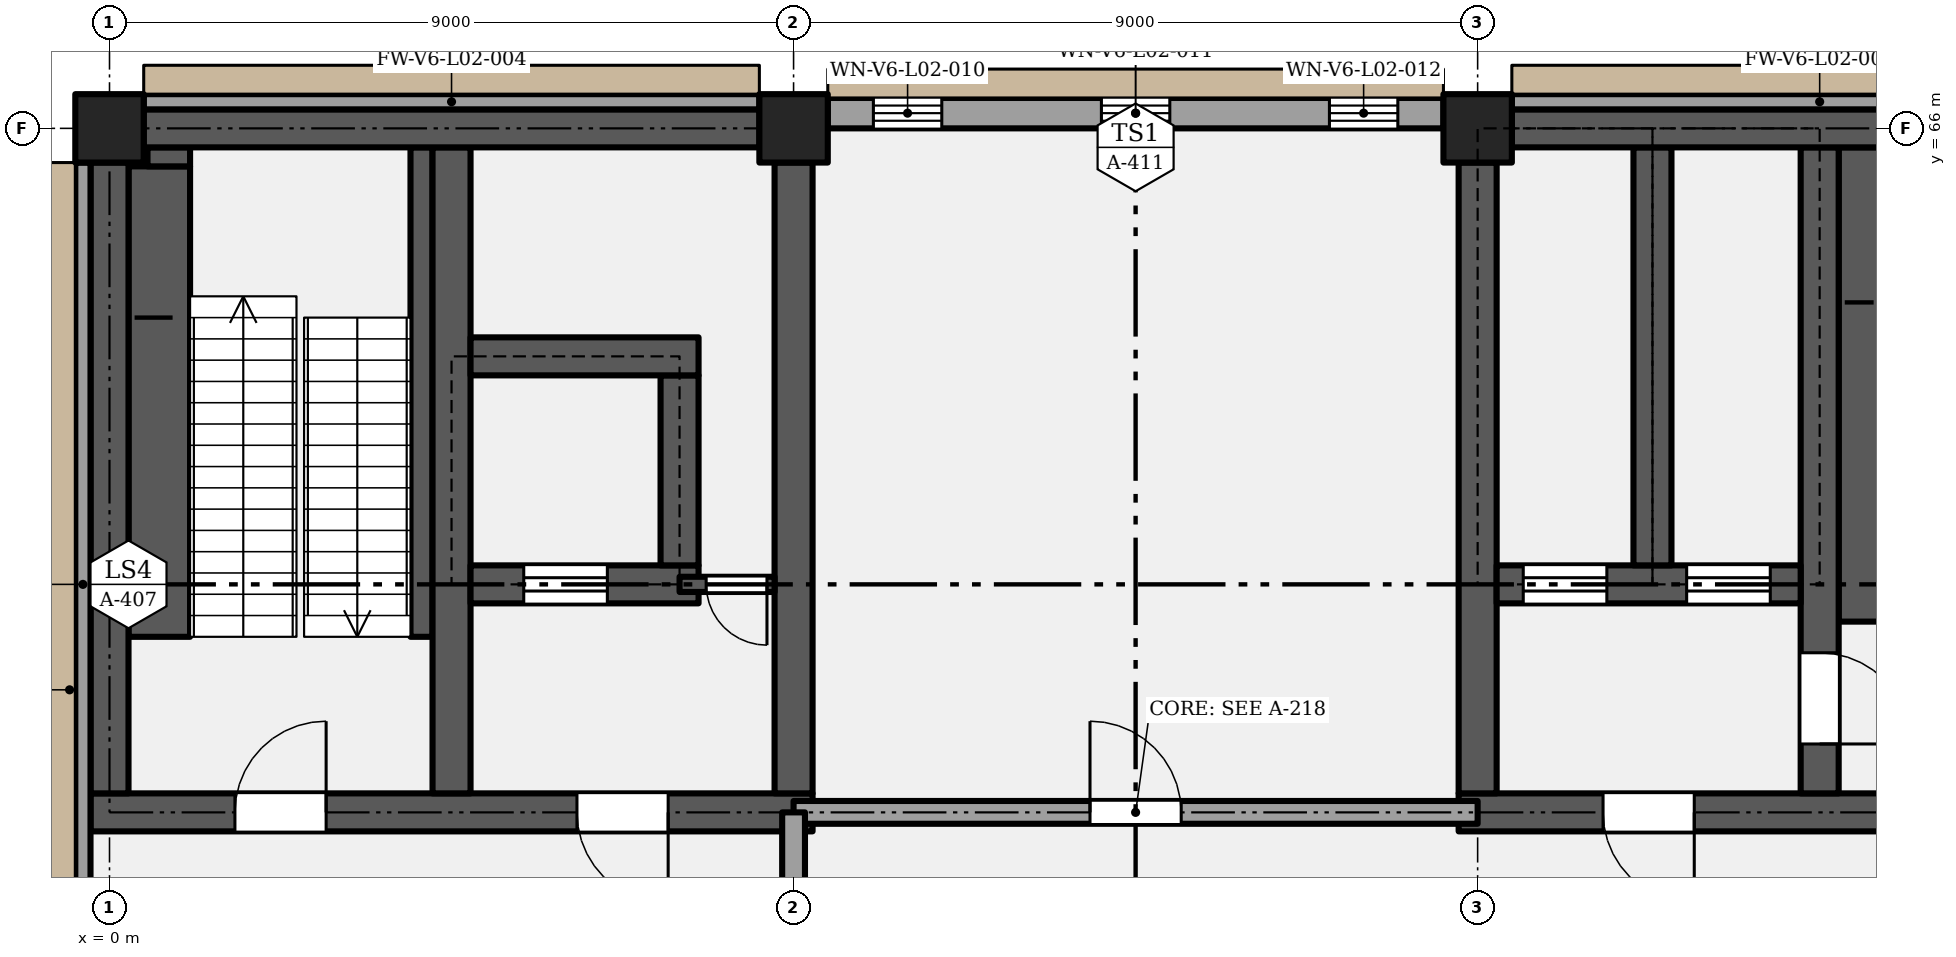
"""IFC4 building model, lengths in metres.
Left out: names, types, materials, properties, quantities, classifications, styles, units other than length and angle.
Written with IfcOpenShell. Run it as: python <this file> out.ifc"""

import sys

from ifc_helpers import new_model, si_unit, direction, frame, frame_2d, origin, origin_2d, place, context, subcontext, project, spatial, rectangle, extrude, element, fill, save


model = new_model("IFC4")
c1 = context("Model", 3, precision=1e-05, world=origin(), true_north=direction((0.0, 1.0)))
c2 = subcontext(c1, "Body", "Model", "MODEL_VIEW")
j1 = project(units=[si_unit("LENGTHUNIT", "METRE"), si_unit("PLANEANGLEUNIT", "RADIAN")], contexts=[c1])
p1 = place(None, origin())
s1 = spatial("IfcSite", under=j1, at=p1, CompositionType="ELEMENT")
p2 = place(p1, origin())
s2 = spatial("IfcBuilding", under=s1, at=p2, CompositionType="ELEMENT")
p3 = place(p2, frame((0.0, 0.0, 12.0)))
s3 = spatial("IfcBuildingStorey", under=s2, at=p3, CompositionType="ELEMENT", Elevation=12.0)
for number, where, z_axis, x_axis in (
    (1, (0.0, 66.0, 0.0), (0.0, 0.0, 1.0), (1.0, 0.0, 0.0)),
    (2, (9.0, 66.0, 0.0), (0.0, 0.0, 1.0), (1.0, 0.0, 0.0)),
    (3, (18.0, 66.0, 0.0), (0.0, 0.0, 1.0), (1.0, 0.0, 0.0)),
):
    element("IfcColumn", number, at=place(p3, frame(where, z_axis=z_axis, x_axis=x_axis)), inside=s3, PredefinedType="COLUMN", context=c2, shape_type="SweptSolid", body=[
        extrude(rectangle(XDim=0.9, YDim=0.9, at=origin_2d()), origin(), (0.0, 0.0, 1.0), 5.4),
    ])
p4 = place(p3, frame((-0.25, 57.0, 0.0), z_axis=(0.0, 0.0, 1.0), x_axis=(1.0, 0.0, 0.0)))
e4 = element("IfcWall", 4, at=p4, inside=s3, PredefinedType="SHEAR", context=c2, shape_type="SweptSolid", body=[
    extrude(rectangle(XDim=9.5, YDim=0.5, at=frame_2d((4.75, 0.0))), origin(), (0.0, 0.0, 1.0), 5.15),
])
p5 = place(p4, frame((1.9, 0.0, 0.0)))
e5 = element("IfcOpeningElement", 5, at=p5, cuts=e4, PredefinedType="OPENING", context=c2, shape_type="SweptSolid", body=[
    extrude(rectangle(XDim=1.2, YDim=2.1, at=frame_2d((0.6, 1.05))), frame((0.0, 0.26, 0.0), z_axis=(0.0, -1.0, 0.0), x_axis=(1.0, 0.0, 0.0)), (0.0, 0.0, 1.0), 0.52),
])
p6 = place(p4, frame((7.6, 0.0, 0.0), z_axis=(0.0, 0.0, 1.0), x_axis=(-1.0, 0.0, 0.0)))
e6 = element("IfcOpeningElement", 6, at=p6, cuts=e4, PredefinedType="OPENING", context=c2, shape_type="SweptSolid", body=[
    extrude(rectangle(XDim=1.2, YDim=2.1, at=frame_2d((0.6, 1.05))), frame((0.0, 0.26, 0.0), z_axis=(0.0, -1.0, 0.0), x_axis=(1.0, 0.0, 0.0)), (0.0, 0.0, 1.0), 0.52),
])
p7 = place(p3, frame((17.75, 57.0, 0.0), z_axis=(0.0, 0.0, 1.0), x_axis=(1.0, 0.0, 0.0)))
e7 = element("IfcWall", 7, at=p7, inside=s3, PredefinedType="SHEAR", context=c2, shape_type="SweptSolid", body=[
    extrude(rectangle(XDim=9.5, YDim=0.5, at=frame_2d((4.75, 0.0))), origin(), (0.0, 0.0, 1.0), 5.15),
])
p8 = place(p7, frame((3.1, 0.0, 0.0), z_axis=(0.0, 0.0, 1.0), x_axis=(-1.0, 0.0, 0.0)))
e8 = element("IfcOpeningElement", 8, at=p8, cuts=e7, PredefinedType="OPENING", context=c2, shape_type="SweptSolid", body=[
    extrude(rectangle(XDim=1.2, YDim=2.1, at=frame_2d((0.6, 1.05))), frame((0.0, 0.26, 0.0), z_axis=(0.0, -1.0, 0.0), x_axis=(1.0, 0.0, 0.0)), (0.0, 0.0, 1.0), 0.52),
])
p9 = place(p7, frame((6.4, 0.0, 0.0)))
e9 = element("IfcOpeningElement", 9, at=p9, cuts=e7, PredefinedType="OPENING", context=c2, shape_type="SweptSolid", body=[
    extrude(rectangle(XDim=1.2, YDim=2.1, at=frame_2d((0.6, 1.05))), frame((0.0, 0.26, 0.0), z_axis=(0.0, -1.0, 0.0), x_axis=(1.0, 0.0, 0.0)), (0.0, 0.0, 1.0), 0.52),
])
p10 = place(p3, frame((0.0, 57.25, 0.0), z_axis=(0.0, 0.0, 1.0), x_axis=(0.0, 1.0, 0.0)))
e10 = element("IfcWall", 10, at=p10, inside=s3, PredefinedType="SHEAR", context=c2, shape_type="SweptSolid", body=[
    extrude(rectangle(XDim=8.3, YDim=0.5, at=frame_2d((4.15, 0.0))), origin(), (0.0, 0.0, 1.0), 5.15),
])
p11 = place(p3, frame((4.5, 57.25, 0.0), z_axis=(0.0, 0.0, 1.0), x_axis=(0.0, 1.0, 0.0)))
e11 = element("IfcWall", 11, at=p11, inside=s3, PredefinedType="SHEAR", context=c2, shape_type="SweptSolid", body=[
    extrude(rectangle(XDim=8.5, YDim=0.5, at=frame_2d((4.25, 0.0))), origin(), (0.0, 0.0, 1.0), 5.15),
])
for number, where, z_axis, x_axis in (
    (12, (9.0, 57.25, 0.0), (0.0, 0.0, 1.0), (0.0, 1.0, 0.0)),
    (13, (18.0, 57.25, 0.0), (0.0, 0.0, 1.0), (0.0, 1.0, 0.0)),
):
    element("IfcWall", number, at=place(p3, frame(where, z_axis=z_axis, x_axis=x_axis)), inside=s3, PredefinedType="SHEAR", context=c2, shape_type="SweptSolid", body=[
        extrude(rectangle(XDim=8.3, YDim=0.5, at=frame_2d((4.15, 0.0))), origin(), (0.0, 0.0, 1.0), 5.15),
    ])
p12 = place(p3, frame((22.5, 57.25, 0.0), z_axis=(0.0, 0.0, 1.0), x_axis=(0.0, 1.0, 0.0)))
e14 = element("IfcWall", 14, at=p12, inside=s3, PredefinedType="SHEAR", context=c2, shape_type="SweptSolid", body=[
    extrude(rectangle(XDim=8.5, YDim=0.5, at=frame_2d((4.25, 0.0))), origin(), (0.0, 0.0, 1.0), 5.15),
])
p13 = place(p12, frame((1.85, 0.0, 0.0), z_axis=(0.0, 0.0, 1.0), x_axis=(-1.0, 0.0, 0.0)))
e15 = element("IfcOpeningElement", 15, at=p13, cuts=e14, PredefinedType="OPENING", context=c2, shape_type="SweptSolid", body=[
    extrude(rectangle(XDim=1.2, YDim=2.1, at=frame_2d((0.6, 1.05))), frame((0.0, 0.26, 0.0), z_axis=(0.0, -1.0, 0.0), x_axis=(1.0, 0.0, 0.0)), (0.0, 0.0, 1.0), 0.52),
])
p14 = place(p3, frame((4.75, 60.0, 0.0), z_axis=(0.0, 0.0, 1.0), x_axis=(1.0, 0.0, 0.0)))
e16 = element("IfcWall", 16, at=p14, inside=s3, PredefinedType="SHEAR", context=c2, shape_type="SweptSolid", body=[
    extrude(rectangle(XDim=3.0, YDim=0.5, at=frame_2d((1.5, 0.0))), origin(), (0.0, 0.0, 1.0), 5.15),
])
p15 = place(p14, frame((0.7, 0.0, 0.0)))
e17 = element("IfcOpeningElement", 17, at=p15, cuts=e16, PredefinedType="OPENING", context=c2, shape_type="SweptSolid", body=[
    extrude(rectangle(XDim=1.1, YDim=2.1, at=frame_2d((0.55, 1.05))), frame((0.0, 0.26, 0.0), z_axis=(0.0, -1.0, 0.0), x_axis=(1.0, 0.0, 0.0)), (0.0, 0.0, 1.0), 0.52),
])
p16 = place(p3, frame((18.25, 60.0, 0.0), z_axis=(0.0, 0.0, 1.0), x_axis=(1.0, 0.0, 0.0)))
e18 = element("IfcWall", 18, at=p16, inside=s3, PredefinedType="SHEAR", context=c2, shape_type="SweptSolid", body=[
    extrude(rectangle(XDim=4.0, YDim=0.5, at=frame_2d((2.0, 0.0))), origin(), (0.0, 0.0, 1.0), 5.15),
])
p17 = place(p16, frame((0.35, 0.0, 0.0)))
e19 = element("IfcOpeningElement", 19, at=p17, cuts=e18, PredefinedType="OPENING", context=c2, shape_type="SweptSolid", body=[
    extrude(rectangle(XDim=1.1, YDim=2.1, at=frame_2d((0.55, 1.05))), frame((0.0, 0.26, 0.0), z_axis=(0.0, -1.0, 0.0), x_axis=(1.0, 0.0, 0.0)), (0.0, 0.0, 1.0), 0.52),
])
p18 = place(p16, frame((2.5, 0.0, 0.0)))
e20 = element("IfcOpeningElement", 20, at=p18, cuts=e18, PredefinedType="OPENING", context=c2, shape_type="SweptSolid", body=[
    extrude(rectangle(XDim=1.1, YDim=2.1, at=frame_2d((0.55, 1.05))), frame((0.0, 0.26, 0.0), z_axis=(0.0, -1.0, 0.0), x_axis=(1.0, 0.0, 0.0)), (0.0, 0.0, 1.0), 0.52),
])
p19 = place(p3, frame((7.5, 60.25, 0.0), z_axis=(0.0, 0.0, 1.0), x_axis=(0.0, 1.0, 0.0)))
e21 = element("IfcWall", 21, at=p19, inside=s3, PredefinedType="SHEAR", context=c2, shape_type="SweptSolid", body=[
    extrude(rectangle(XDim=2.5, YDim=0.5, at=frame_2d((1.25, 0.0))), origin(), (0.0, 0.0, 1.0), 5.15),
])
p20 = place(p3, frame((20.3, 60.25, 0.0), z_axis=(0.0, 0.0, 1.0), x_axis=(0.0, 1.0, 0.0)))
e22 = element("IfcWall", 22, at=p20, inside=s3, PredefinedType="SHEAR", context=c2, shape_type="SweptSolid", body=[
    extrude(rectangle(XDim=5.5, YDim=0.5, at=frame_2d((2.75, 0.0))), origin(), (0.0, 0.0, 1.0), 5.15),
])
p21 = place(p3, frame((4.75, 63.0, 0.0), z_axis=(0.0, 0.0, 1.0), x_axis=(1.0, 0.0, 0.0)))
e23 = element("IfcWall", 23, at=p21, inside=s3, PredefinedType="SHEAR", context=c2, shape_type="SweptSolid", body=[
    extrude(rectangle(XDim=3.0, YDim=0.5, at=frame_2d((1.5, 0.0))), origin(), (0.0, 0.0, 1.0), 5.15),
])
for number, where, z_axis, x_axis in (
    (24, (0.45, 66.0, 0.0), (0.0, 0.0, 1.0), (1.0, 0.0, 0.0)),
    (25, (18.45, 66.0, 0.0), (0.0, 0.0, 1.0), (1.0, 0.0, 0.0)),
):
    element("IfcWall", number, at=place(p3, frame(where, z_axis=z_axis, x_axis=x_axis)), inside=s3, PredefinedType="SHEAR", context=c2, shape_type="SweptSolid", body=[
        extrude(rectangle(XDim=8.1, YDim=0.5, at=frame_2d((4.05, 0.0))), origin(), (0.0, 0.0, 1.0), 5.15),
    ])
p22 = place(p3, frame((0.45, 66.35, 0.0), z_axis=(0.0, 0.0, 1.0), x_axis=(1.0, 0.0, 0.0)))
e26 = element("IfcWall", 26, at=p22, inside=s3, PredefinedType="SOLIDWALL", context=c2, shape_type="SweptSolid", body=[
    extrude(rectangle(XDim=8.1, YDim=0.2, at=frame_2d((4.05, 0.0))), origin(), (0.0, 0.0, 1.0), 5.15),
])
p23 = place(p3, frame((9.45, 66.2, 0.0), z_axis=(0.0, 0.0, 1.0), x_axis=(1.0, 0.0, 0.0)))
e27 = element("IfcWall", 27, at=p23, inside=s3, PredefinedType="SOLIDWALL", context=c2, shape_type="SweptSolid", body=[
    extrude(rectangle(XDim=8.1, YDim=0.4, at=frame_2d((4.05, 0.0))), origin(), (0.0, 0.0, 1.0), 5.15),
])
p24 = place(p23, frame((0.6, 0.0, 1.5)))
e28 = element("IfcOpeningElement", 28, at=p24, cuts=e27, PredefinedType="OPENING", context=c2, shape_type="SweptSolid", body=[
    extrude(rectangle(XDim=0.9, YDim=1.8, at=frame_2d((0.45, 0.9))), frame((0.0, 0.21, 0.0), z_axis=(0.0, -1.0, 0.0), x_axis=(1.0, 0.0, 0.0)), (0.0, 0.0, 1.0), 0.42),
])
p25 = place(p23, frame((3.6, 0.0, 1.5)))
e29 = element("IfcOpeningElement", 29, at=p25, cuts=e27, PredefinedType="OPENING", context=c2, shape_type="SweptSolid", body=[
    extrude(rectangle(XDim=0.9, YDim=1.8, at=frame_2d((0.45, 0.9))), frame((0.0, 0.21, 0.0), z_axis=(0.0, -1.0, 0.0), x_axis=(1.0, 0.0, 0.0)), (0.0, 0.0, 1.0), 0.42),
])
p26 = place(p23, frame((6.6, 0.0, 1.5)))
e30 = element("IfcOpeningElement", 30, at=p26, cuts=e27, PredefinedType="OPENING", context=c2, shape_type="SweptSolid", body=[
    extrude(rectangle(XDim=0.9, YDim=1.8, at=frame_2d((0.45, 0.9))), frame((0.0, 0.21, 0.0), z_axis=(0.0, -1.0, 0.0), x_axis=(1.0, 0.0, 0.0)), (0.0, 0.0, 1.0), 0.42),
])
p27 = place(p3, frame((18.45, 66.35, 0.0), z_axis=(0.0, 0.0, 1.0), x_axis=(1.0, 0.0, 0.0)))
e31 = element("IfcWall", 31, at=p27, inside=s3, PredefinedType="SOLIDWALL", context=c2, shape_type="SweptSolid", body=[
    extrude(rectangle(XDim=8.1, YDim=0.2, at=frame_2d((4.05, 0.0))), origin(), (0.0, 0.0, 1.0), 5.15),
])
p28 = place(p3, frame((-0.35, 54.45, 0.0), z_axis=(0.0, 0.0, 1.0), x_axis=(0.0, 1.0, 0.0)))
e32 = element("IfcWall", 32, at=p28, inside=s3, PredefinedType="SOLIDWALL", context=c2, shape_type="SweptSolid", body=[
    extrude(rectangle(XDim=11.1, YDim=0.2, at=frame_2d((5.55, 0.0))), origin(), (0.0, 0.0, 1.0), 5.15),
])
p29 = place(p28, frame((0.45, 0.0, 0.9)))
e33 = element("IfcOpeningElement", 33, at=p29, cuts=e32, PredefinedType="OPENING", context=c2, shape_type="SweptSolid", body=[
    extrude(rectangle(XDim=1.2, YDim=2.4, at=frame_2d((0.6, 1.2))), frame((0.0, 0.11, 0.0), z_axis=(0.0, -1.0, 0.0), x_axis=(1.0, 0.0, 0.0)), (0.0, 0.0, 1.0), 0.22),
])
p30 = place(p3, frame((9.0, 57.0, 0.0), z_axis=(0.0, 0.0, 1.0), x_axis=(1.0, 0.0, 0.0)))
e34 = element("IfcWall", 34, at=p30, inside=s3, PredefinedType="PARTITIONING", context=c2, shape_type="SweptSolid", body=[
    extrude(rectangle(XDim=9.0, YDim=0.3, at=frame_2d((4.5, 0.0))), origin(), (0.0, 0.0, 1.0), 5.15),
])
p31 = place(p30, frame((3.9, 0.0, 0.0)))
e35 = element("IfcOpeningElement", 35, at=p31, cuts=e34, PredefinedType="OPENING", context=c2, shape_type="SweptSolid", body=[
    extrude(rectangle(XDim=1.2, YDim=2.1, at=frame_2d((0.6, 1.05))), frame((0.0, 0.16, 0.0), z_axis=(0.0, -1.0, 0.0), x_axis=(1.0, 0.0, 0.0)), (0.0, 0.0, 1.0), 0.32),
])
p32 = place(p3, frame((7.5, 60.0, 0.0), z_axis=(0.0, 0.0, 1.0), x_axis=(1.0, 0.0, 0.0)))
e36 = element("IfcWall", 36, at=p32, inside=s3, PredefinedType="SHEAR", context=c2, shape_type="SweptSolid", body=[
    extrude(rectangle(XDim=1.25, YDim=0.2, at=frame_2d((0.625, 0.0))), origin(), (0.0, 0.0, 1.0), 5.15),
])
p33 = place(p32, frame((1.15, 0.0, 0.0), z_axis=(0.0, 0.0, 1.0), x_axis=(-1.0, 0.0, 0.0)))
e37 = element("IfcOpeningElement", 37, at=p33, cuts=e36, PredefinedType="OPENING", context=c2, shape_type="SweptSolid", body=[
    extrude(rectangle(XDim=0.8, YDim=2.0, at=frame_2d((0.4, 1.0))), frame((0.0, 0.11, 0.0), z_axis=(0.0, -1.0, 0.0), x_axis=(1.0, 0.0, 0.0)), (0.0, 0.0, 1.0), 0.22),
])
p34 = place(p3, frame((9.0, 54.5, 0.0), z_axis=(0.0, 0.0, 1.0), x_axis=(0.0, 1.0, 0.0)))
e38 = element("IfcWall", 38, at=p34, inside=s3, PredefinedType="PARTITIONING", context=c2, shape_type="SweptSolid", body=[
    extrude(rectangle(XDim=2.5, YDim=0.3, at=frame_2d((1.25, 0.0))), origin(), (0.0, 0.0, 1.0), 4.4),
])
p35 = place(p3, frame((23.095, 59.51, 0.0), z_axis=(0.0, 0.0, 1.0), x_axis=(0.0, 1.0, 0.0)))
e39 = element("IfcWall", 39, at=p35, inside=s3, PredefinedType="SHEAR", context=c2, shape_type="SweptSolid", body=[
    extrude(rectangle(XDim=6.24, YDim=0.69, at=frame_2d((3.12, 0.0))), origin(), (0.0, 0.0, 1.0), 2.587),
])
p36 = place(p3, frame((0.655, 59.31, 0.0), z_axis=(0.0, 0.0, 1.0), x_axis=(0.0, 1.0, 0.0)))
e40 = element("IfcWall", 40, at=p36, inside=s3, PredefinedType="SHEAR", context=c2, shape_type="SweptSolid", body=[
    extrude(rectangle(XDim=6.19, YDim=0.81, at=frame_2d((3.095, 0.0))), origin(), (0.0, 0.0, 1.0), 2.587),
])
p37 = place(p3, frame((0.78, 65.5, 0.0), z_axis=(0.0, 0.0, 1.0), x_axis=(0.0, 1.0, 0.0)))
e41 = element("IfcWall", 41, at=p37, inside=s3, PredefinedType="SHEAR", context=c2, shape_type="SweptSolid", body=[
    extrude(rectangle(XDim=0.25, YDim=0.56, at=frame_2d((0.125, 0.0))), origin(), (0.0, 0.0, 1.0), 2.587),
])
p38 = place(p3, frame((4.105, 59.31, 0.0), z_axis=(0.0, 0.0, 1.0), x_axis=(0.0, 1.0, 0.0)))
e42 = element("IfcWall", 42, at=p38, inside=s3, PredefinedType="SHEAR", context=c2, shape_type="SweptSolid", body=[
    extrude(rectangle(XDim=6.44, YDim=0.29, at=frame_2d((3.22, 0.0))), origin(), (0.0, 0.0, 1.0), 2.587),
])
p39 = place(p24, origin())
e43 = element("IfcWindow", 43, at=p39, inside=s3, PartitioningType="SINGLE_PANEL", PredefinedType="WINDOW", context=c2, shape_type="SweptSolid", body=[
    extrude(rectangle(XDim=0.9, YDim=1.8, at=frame_2d((0.45, 0.9))), frame((0.0, 0.03, 0.0), z_axis=(0.0, -1.0, 0.0), x_axis=(1.0, 0.0, 0.0)), (0.0, 0.0, 1.0), 0.06),
])
fill(e28, e43)
p40 = place(p25, origin())
e44 = element("IfcWindow", 44, at=p40, inside=s3, PartitioningType="SINGLE_PANEL", PredefinedType="WINDOW", context=c2, shape_type="SweptSolid", body=[
    extrude(rectangle(XDim=0.9, YDim=1.8, at=frame_2d((0.45, 0.9))), frame((0.0, 0.03, 0.0), z_axis=(0.0, -1.0, 0.0), x_axis=(1.0, 0.0, 0.0)), (0.0, 0.0, 1.0), 0.06),
])
fill(e29, e44)
p41 = place(p26, origin())
e45 = element("IfcWindow", 45, at=p41, inside=s3, PartitioningType="SINGLE_PANEL", PredefinedType="WINDOW", context=c2, shape_type="SweptSolid", body=[
    extrude(rectangle(XDim=0.9, YDim=1.8, at=frame_2d((0.45, 0.9))), frame((0.0, 0.03, 0.0), z_axis=(0.0, -1.0, 0.0), x_axis=(1.0, 0.0, 0.0)), (0.0, 0.0, 1.0), 0.06),
])
fill(e30, e45)
p42 = place(p5, origin())
e46 = element("IfcDoor", 46, at=p42, inside=s3, OperationType="SINGLE_SWING_RIGHT", PredefinedType="DOOR", context=c2, shape_type="SweptSolid", body=[
    extrude(rectangle(XDim=1.2, YDim=2.1, at=frame_2d((0.6, 1.05))), frame((0.0, 0.025, 0.0), z_axis=(0.0, -1.0, 0.0), x_axis=(1.0, 0.0, 0.0)), (0.0, 0.0, 1.0), 0.05),
])
fill(e5, e46)
p43 = place(p6, origin())
e47 = element("IfcDoor", 47, at=p43, inside=s3, OperationType="SINGLE_SWING_LEFT", PredefinedType="DOOR", context=c2, shape_type="SweptSolid", body=[
    extrude(rectangle(XDim=1.2, YDim=2.1, at=frame_2d((0.6, 1.05))), frame((0.0, 0.025, 0.0), z_axis=(0.0, -1.0, 0.0), x_axis=(1.0, 0.0, 0.0)), (0.0, 0.0, 1.0), 0.05),
])
fill(e6, e47)
p44 = place(p15, origin())
e48 = element("IfcDoor", 48, at=p44, inside=s3, OperationType="SLIDING_TO_LEFT", PredefinedType="DOOR", context=c2, shape_type="SweptSolid", body=[
    extrude(rectangle(XDim=1.1, YDim=2.1, at=frame_2d((0.55, 1.05))), frame((0.0, 0.025, 0.0), z_axis=(0.0, -1.0, 0.0), x_axis=(1.0, 0.0, 0.0)), (0.0, 0.0, 1.0), 0.05),
])
fill(e17, e48)
p45 = place(p33, origin())
e49 = element("IfcDoor", 49, at=p45, inside=s3, OperationType="SINGLE_SWING_LEFT", PredefinedType="DOOR", context=c2, shape_type="SweptSolid", body=[
    extrude(rectangle(XDim=0.8, YDim=2.0, at=frame_2d((0.4, 1.0))), frame((0.0, 0.025, 0.0), z_axis=(0.0, -1.0, 0.0), x_axis=(1.0, 0.0, 0.0)), (0.0, 0.0, 1.0), 0.05),
])
fill(e37, e49)
p46 = place(p8, origin())
e50 = element("IfcDoor", 50, at=p46, inside=s3, OperationType="SINGLE_SWING_LEFT", PredefinedType="DOOR", context=c2, shape_type="SweptSolid", body=[
    extrude(rectangle(XDim=1.2, YDim=2.1, at=frame_2d((0.6, 1.05))), frame((0.0, 0.025, 0.0), z_axis=(0.0, -1.0, 0.0), x_axis=(1.0, 0.0, 0.0)), (0.0, 0.0, 1.0), 0.05),
])
fill(e8, e50)
p47 = place(p17, origin())
e51 = element("IfcDoor", 51, at=p47, inside=s3, OperationType="SLIDING_TO_LEFT", PredefinedType="DOOR", context=c2, shape_type="SweptSolid", body=[
    extrude(rectangle(XDim=1.1, YDim=2.1, at=frame_2d((0.55, 1.05))), frame((0.0, 0.025, 0.0), z_axis=(0.0, -1.0, 0.0), x_axis=(1.0, 0.0, 0.0)), (0.0, 0.0, 1.0), 0.05),
])
fill(e19, e51)
p48 = place(p18, origin())
e52 = element("IfcDoor", 52, at=p48, inside=s3, OperationType="SLIDING_TO_LEFT", PredefinedType="DOOR", context=c2, shape_type="SweptSolid", body=[
    extrude(rectangle(XDim=1.1, YDim=2.1, at=frame_2d((0.55, 1.05))), frame((0.0, 0.025, 0.0), z_axis=(0.0, -1.0, 0.0), x_axis=(1.0, 0.0, 0.0)), (0.0, 0.0, 1.0), 0.05),
])
fill(e20, e52)
p49 = place(p13, origin())
e53 = element("IfcDoor", 53, at=p49, inside=s3, OperationType="SINGLE_SWING_RIGHT", PredefinedType="DOOR", context=c2, shape_type="SweptSolid", body=[
    extrude(rectangle(XDim=1.2, YDim=2.1, at=frame_2d((0.6, 1.05))), frame((0.0, 0.025, 0.0), z_axis=(0.0, -1.0, 0.0), x_axis=(1.0, 0.0, 0.0)), (0.0, 0.0, 1.0), 0.05),
])
fill(e15, e53)
p50 = place(p31, origin())
e54 = element("IfcDoor", 54, at=p50, inside=s3, OperationType="SINGLE_SWING_LEFT", PredefinedType="DOOR", context=c2, shape_type="SweptSolid", body=[
    extrude(rectangle(XDim=1.2, YDim=2.1, at=frame_2d((0.6, 1.05))), frame((0.0, 0.025, 0.0), z_axis=(0.0, -1.0, 0.0), x_axis=(1.0, 0.0, 0.0)), (0.0, 0.0, 1.0), 0.05),
])
fill(e35, e54)
save(model, sys.argv[1])
